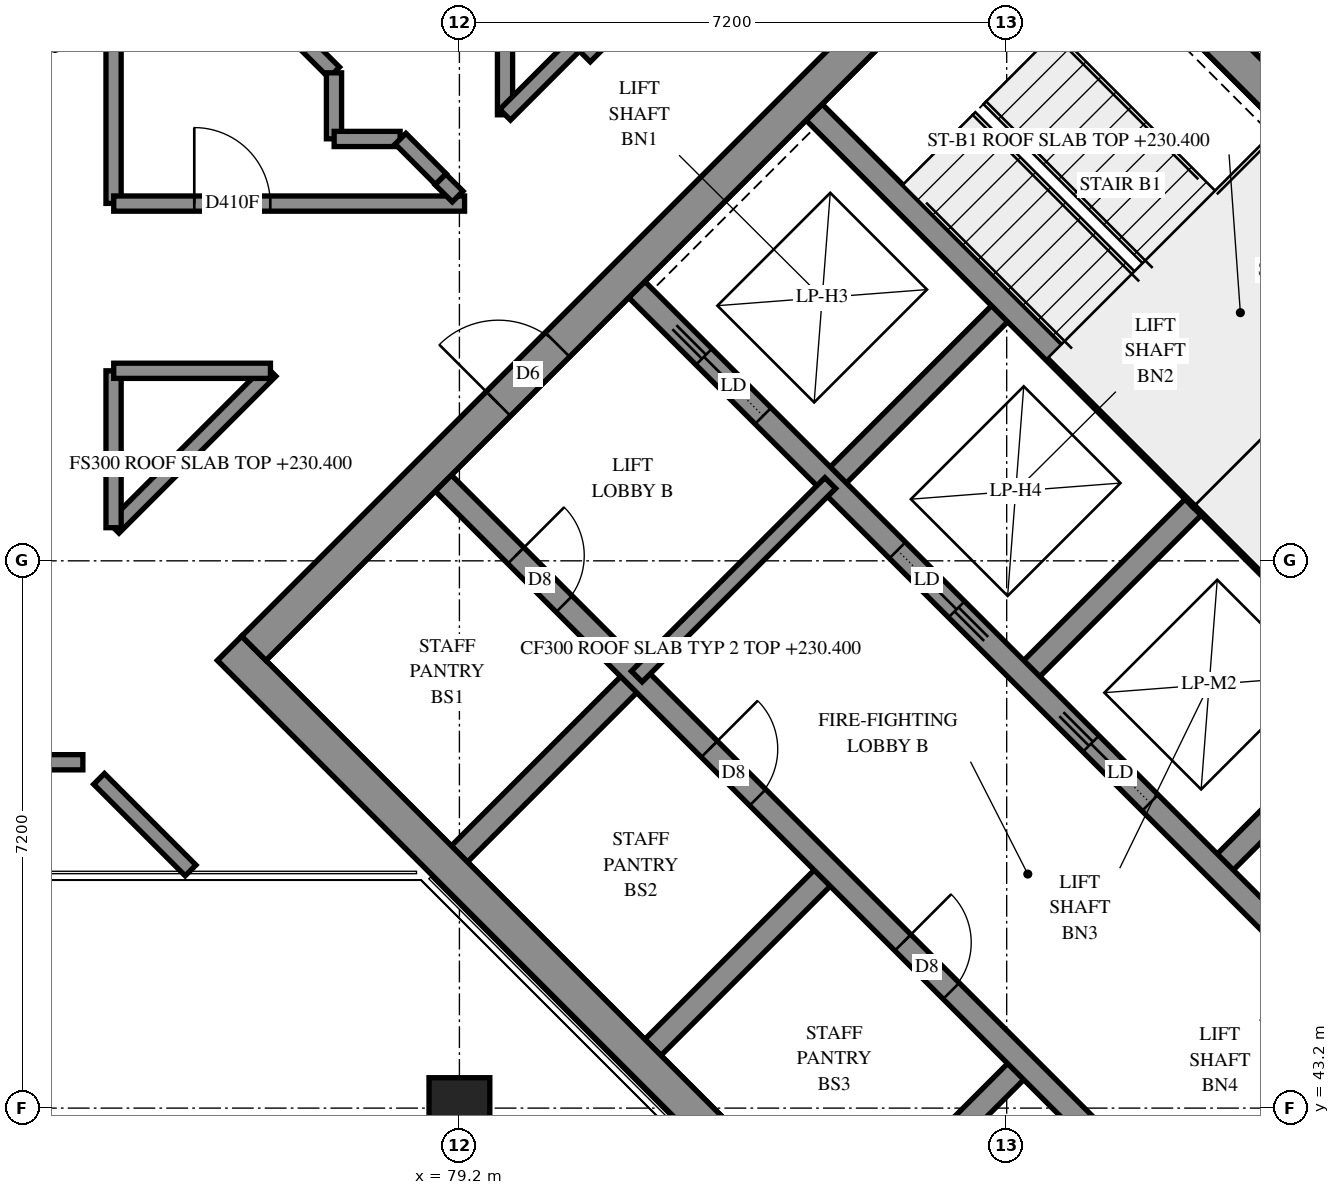
"""IFC4 building model, lengths in metres.
Left out: names, types, materials, properties, quantities, classifications, styles, units other than length and angle.
Written with IfcOpenShell. Run it as: python <this file> out.ifc"""

import sys

from ifc_helpers import new_model, si_unit, direction, frame, frame_2d, origin, origin_2d, place, context, subcontext, project, spatial, polyline, rectangle, outline, extrude, element, fill, save


model = new_model("IFC4")
c1 = context("Model", 3, precision=1e-05, world=origin(), true_north=direction((0.0, 1.0)))
c2 = subcontext(c1, "Body", "Model", "MODEL_VIEW")
j1 = project(units=[si_unit("LENGTHUNIT", "METRE"), si_unit("PLANEANGLEUNIT", "RADIAN")], contexts=[c1])
p1 = place(None, origin())
s1 = spatial("IfcSite", under=j1, at=p1, CompositionType="ELEMENT")
p2 = place(p1, origin())
s2 = spatial("IfcBuilding", under=s1, at=p2, CompositionType="ELEMENT")
p3 = place(p2, frame((0.0, 0.0, 230.4)))
s3 = spatial("IfcBuildingStorey", under=s2, at=p3, CompositionType="ELEMENT", Elevation=230.4)
p4 = place(p3, frame((79.2, 43.2, 0.0), z_axis=(0.0, 0.0, 1.0), x_axis=(1.0, 0.0, 0.0)))
e1 = element("IfcColumn", 1, at=p4, inside=s3, PredefinedType="COLUMN", context=c2, shape_type="SweptSolid", body=[
    extrude(rectangle(XDim=0.8, YDim=0.8, at=origin_2d()), origin(), (0.0, 0.0, 1.0), 3.9),
])
p5 = place(p3, frame((76.177, 49.249, -0.3), z_axis=(0.0, 0.0, 1.0), x_axis=(0.7071100491, -0.7071035132, 0.0)))
e2 = element("IfcWall", 2, at=p5, inside=s3, PredefinedType="SHEAR", context=c2, shape_type="SweptSolid", body=[
    extrude(rectangle(XDim=15.3, YDim=0.45, at=frame_2d((7.65, 0.0))), origin(), (0.0, 0.0, 1.0), 3.5),
])
p6 = place(p3, frame((86.678, 59.749, -0.3), z_axis=(0.0, 0.0, 1.0), x_axis=(0.7071035132, -0.7071100491, 0.0)))
e3 = element("IfcWall", 3, at=p6, inside=s3, PredefinedType="SHEAR", context=c2, shape_type="SweptSolid", body=[
    extrude(rectangle(XDim=15.3, YDim=0.45, at=frame_2d((7.65, 0.0))), origin(), (0.0, 0.0, 1.0), 3.5),
])
p7 = place(p6, frame((10.45, 0.0, 0.3)))
e4 = element("IfcOpeningElement", 4, at=p7, cuts=e3, PredefinedType="OPENING", context=c2, shape_type="SweptSolid", body=[
    extrude(rectangle(XDim=0.8, YDim=2.1, at=frame_2d((0.4, 1.05))), frame((0.0, 0.235, 0.0), z_axis=(0.0, -1.0, 0.0), x_axis=(1.0, 0.0, 0.0)), (0.0, 0.0, 1.0), 0.47),
])
p8 = place(p3, frame((76.495, 49.249, -0.3), z_axis=(0.0, 0.0, 1.0), x_axis=(0.7071067812, 0.7071067812, 0.0)))
e5 = element("IfcWall", 5, at=p8, inside=s3, PredefinedType="SHEAR", context=c2, shape_type="SweptSolid", body=[
    extrude(rectangle(XDim=14.4, YDim=0.45, at=frame_2d((7.2, 0.0))), origin(), (0.0, 0.0, 1.0), 3.5),
])
p9 = place(p8, frame((4.55, 0.0, 0.3)))
e6 = element("IfcOpeningElement", 6, at=p9, cuts=e5, PredefinedType="OPENING", context=c2, shape_type="SweptSolid", body=[
    extrude(rectangle(XDim=1.1, YDim=2.1, at=frame_2d((0.55, 1.05))), frame((0.0, 0.235, 0.0), z_axis=(0.0, -1.0, 0.0), x_axis=(1.0, 0.0, 0.0)), (0.0, 0.0, 1.0), 0.47),
])
p10 = place(p8, frame((11.35, 0.0, 0.3)))
e7 = element("IfcOpeningElement", 7, at=p10, cuts=e5, PredefinedType="OPENING", context=c2, shape_type="SweptSolid", body=[
    extrude(rectangle(XDim=1.1, YDim=2.1, at=frame_2d((0.55, 1.05))), frame((0.0, 0.235, 0.0), z_axis=(0.0, -1.0, 0.0), x_axis=(1.0, 0.0, 0.0)), (0.0, 0.0, 1.0), 0.47),
])
p11 = place(p3, frame((86.996, 38.748, -0.3), z_axis=(0.0, 0.0, 1.0), x_axis=(0.7071067812, 0.7071067812, 0.0)))
e8 = element("IfcWall", 8, at=p11, inside=s3, PredefinedType="SHEAR", context=c2, shape_type="SweptSolid", body=[
    extrude(rectangle(XDim=14.4, YDim=0.45, at=frame_2d((7.2, 0.0))), origin(), (0.0, 0.0, 1.0), 3.5),
])
p12 = place(p11, frame((4.55, 0.0, 0.3)))
e9 = element("IfcOpeningElement", 9, at=p12, cuts=e8, PredefinedType="OPENING", context=c2, shape_type="SweptSolid", body=[
    extrude(rectangle(XDim=1.1, YDim=2.1, at=frame_2d((0.55, 1.05))), frame((0.0, 0.235, 0.0), z_axis=(0.0, -1.0, 0.0), x_axis=(1.0, 0.0, 0.0)), (0.0, 0.0, 1.0), 0.47),
])
p13 = place(p11, frame((11.35, 0.0, 0.3)))
e10 = element("IfcOpeningElement", 10, at=p13, cuts=e8, PredefinedType="OPENING", context=c2, shape_type="SweptSolid", body=[
    extrude(rectangle(XDim=1.1, YDim=2.1, at=frame_2d((0.55, 1.05))), frame((0.0, 0.235, 0.0), z_axis=(0.0, -1.0, 0.0), x_axis=(1.0, 0.0, 0.0)), (0.0, 0.0, 1.0), 0.47),
])
for number, where, z_axis, x_axis in (
    (11, (79.2, 46.544, 0.0), (0.0, 0.0, 1.0), (0.707, 0.707, 0.0)),
    (12, (84.079, 51.423, 0.0), (0.0, 0.0, 1.0), (0.707, 0.707, 0.0)),
):
    element("IfcWall", number, at=place(p3, frame(where, z_axis=z_axis, x_axis=x_axis)), inside=s3, PredefinedType="SOLIDWALL", context=c2, shape_type="SweptSolid", body=[
        extrude(rectangle(XDim=3.3, YDim=0.3, at=frame_2d((1.65, 0.0))), origin(), (0.0, 0.0, 1.0), 3.9),
    ])
p14 = place(p3, frame((81.746, 43.999, 0.0), z_axis=(0.0, 0.0, 1.0), x_axis=(0.7071067812, 0.7071067812, 0.0)))
e13 = element("IfcWall", 13, at=p14, inside=s3, PredefinedType="SOLIDWALL", context=c2, shape_type="SweptSolid", body=[
    extrude(rectangle(XDim=3.3, YDim=0.3, at=frame_2d((1.65, 0.0))), origin(), (0.0, 0.0, 1.0), 3.9),
])
p15 = place(p3, frame((86.625, 48.878, 0.0), z_axis=(0.0, 0.0, 1.0), x_axis=(0.7071067812, 0.7071067812, 0.0)))
e14 = element("IfcWall", 14, at=p15, inside=s3, PredefinedType="SOLIDWALL", context=c2, shape_type="SweptSolid", body=[
    extrude(rectangle(XDim=3.3, YDim=0.3, at=frame_2d((1.65, 0.0))), origin(), (0.0, 0.0, 1.0), 3.9),
])
p16 = place(p3, frame((84.291, 41.453, 0.0), z_axis=(0.0, 0.0, 1.0), x_axis=(0.7071067812, 0.7071067812, 0.0)))
e15 = element("IfcWall", 15, at=p16, inside=s3, PredefinedType="SOLIDWALL", context=c2, shape_type="SweptSolid", body=[
    extrude(rectangle(XDim=3.3, YDim=0.3, at=frame_2d((1.65, 0.0))), origin(), (0.0, 0.0, 1.0), 3.9),
])
p17 = place(p3, frame((89.17, 46.332, 0.0), z_axis=(0.0, 0.0, 1.0), x_axis=(0.7071067812, 0.7071067812, 0.0)))
e16 = element("IfcWall", 16, at=p17, inside=s3, PredefinedType="SOLIDWALL", context=c2, shape_type="SweptSolid", body=[
    extrude(rectangle(XDim=3.3, YDim=0.3, at=frame_2d((1.65, 0.0))), origin(), (0.0, 0.0, 1.0), 3.9),
])
p18 = place(p3, frame((78.988, 51.423, 0.0), z_axis=(0.0, 0.0, 1.0), x_axis=(0.7071067812, -0.7071067812, 0.0)))
e17 = element("IfcWall", 17, at=p18, inside=s3, PredefinedType="SOLIDWALL", context=c2, shape_type="SweptSolid", body=[
    extrude(rectangle(XDim=14.4, YDim=0.3, at=frame_2d((7.2, 0.0))), origin(), (0.0, 0.0, 1.0), 3.9),
])
p19 = place(p18, frame((1.35, 0.0, 0.0)))
e18 = element("IfcOpeningElement", 18, at=p19, cuts=e17, PredefinedType="OPENING", context=c2, shape_type="SweptSolid", body=[
    extrude(rectangle(XDim=0.9, YDim=2.1, at=frame_2d((0.45, 1.05))), frame((0.0, 0.16, 0.0), z_axis=(0.0, -1.0, 0.0), x_axis=(1.0, 0.0, 0.0)), (0.0, 0.0, 1.0), 0.32),
])
p20 = place(p18, frame((4.95, 0.0, 0.0)))
e19 = element("IfcOpeningElement", 19, at=p20, cuts=e17, PredefinedType="OPENING", context=c2, shape_type="SweptSolid", body=[
    extrude(rectangle(XDim=0.9, YDim=2.1, at=frame_2d((0.45, 1.05))), frame((0.0, 0.16, 0.0), z_axis=(0.0, -1.0, 0.0), x_axis=(1.0, 0.0, 0.0)), (0.0, 0.0, 1.0), 0.32),
])
p21 = place(p18, frame((8.55, 0.0, 0.0)))
e20 = element("IfcOpeningElement", 20, at=p21, cuts=e17, PredefinedType="OPENING", context=c2, shape_type="SweptSolid", body=[
    extrude(rectangle(XDim=0.9, YDim=2.1, at=frame_2d((0.45, 1.05))), frame((0.0, 0.16, 0.0), z_axis=(0.0, -1.0, 0.0), x_axis=(1.0, 0.0, 0.0)), (0.0, 0.0, 1.0), 0.32),
])
p22 = place(p18, frame((12.05, 0.0, 0.0)))
e21 = element("IfcOpeningElement", 21, at=p22, cuts=e17, PredefinedType="OPENING", context=c2, shape_type="SweptSolid", body=[
    extrude(rectangle(XDim=1.1, YDim=2.1, at=frame_2d((0.55, 1.05))), frame((0.0, 0.16, 0.0), z_axis=(0.0, -1.0, 0.0), x_axis=(1.0, 0.0, 0.0)), (0.0, 0.0, 1.0), 0.32),
])
p23 = place(p3, frame((81.534, 53.969, 0.0), z_axis=(0.0, 0.0, 1.0), x_axis=(0.707103309, -0.7071102534, 0.0)))
e22 = element("IfcWall", 22, at=p23, inside=s3, PredefinedType="SOLIDWALL", context=c2, shape_type="SweptSolid", body=[
    extrude(rectangle(XDim=14.4, YDim=0.3, at=frame_2d((7.2, 0.0))), origin(), (0.0, 0.0, 1.0), 3.9),
])
p24 = place(p23, frame((1.25, 0.0, 0.0)))
e23 = element("IfcOpeningElement", 23, at=p24, cuts=e22, PredefinedType="OPENING", context=c2, shape_type="SweptSolid", body=[
    extrude(rectangle(XDim=1.1, YDim=2.1, at=frame_2d((0.55, 1.05))), frame((0.0, 0.16, 0.0), z_axis=(0.0, -1.0, 0.0), x_axis=(1.0, 0.0, 0.0)), (0.0, 0.0, 1.0), 0.32),
])
p25 = place(p23, frame((4.85, 0.0, 0.0)))
e24 = element("IfcOpeningElement", 24, at=p25, cuts=e22, PredefinedType="OPENING", context=c2, shape_type="SweptSolid", body=[
    extrude(rectangle(XDim=1.1, YDim=2.1, at=frame_2d((0.55, 1.05))), frame((0.0, 0.16, 0.0), z_axis=(0.0, -1.0, 0.0), x_axis=(1.0, 0.0, 0.0)), (0.0, 0.0, 1.0), 0.32),
])
p26 = place(p23, frame((8.45, 0.0, 0.0)))
e25 = element("IfcOpeningElement", 25, at=p26, cuts=e22, PredefinedType="OPENING", context=c2, shape_type="SweptSolid", body=[
    extrude(rectangle(XDim=1.1, YDim=2.1, at=frame_2d((0.55, 1.05))), frame((0.0, 0.16, 0.0), z_axis=(0.0, -1.0, 0.0), x_axis=(1.0, 0.0, 0.0)), (0.0, 0.0, 1.0), 0.32),
])
p27 = place(p23, frame((12.05, 0.0, 0.0)))
e26 = element("IfcOpeningElement", 26, at=p27, cuts=e22, PredefinedType="OPENING", context=c2, shape_type="SweptSolid", body=[
    extrude(rectangle(XDim=1.1, YDim=2.1, at=frame_2d((0.55, 1.05))), frame((0.0, 0.16, 0.0), z_axis=(0.0, -1.0, 0.0), x_axis=(1.0, 0.0, 0.0)), (0.0, 0.0, 1.0), 0.32),
])
for number, where, z_axis, x_axis in (
    (27, (83.867, 56.302, 0.0), (0.0, 0.0, 1.0), (0.707, -0.707, 0.0)),
    (28, (88.958, 51.211, 0.0), (0.0, 0.0, 1.0), (0.707, -0.707, 0.0)),
):
    element("IfcWall", number, at=place(p3, frame(where, z_axis=z_axis, x_axis=x_axis)), inside=s3, PredefinedType="SOLIDWALL", context=c2, shape_type="SweptSolid", body=[
        extrude(rectangle(XDim=7.2, YDim=0.3, at=frame_2d((3.6, 0.0))), origin(), (0.0, 0.0, 1.0), 3.9),
    ])
p28 = place(p3, frame((88.958, 51.211, 0.0), z_axis=(0.0, 0.0, 1.0), x_axis=(0.7071067812, 0.7071067812, 0.0)))
e29 = element("IfcWall", 29, at=p28, inside=s3, PredefinedType="SOLIDWALL", context=c2, shape_type="SweptSolid", body=[
    extrude(rectangle(XDim=4.2, YDim=0.3, at=frame_2d((2.1, 0.0))), origin(), (0.0, 0.0, 1.0), 3.9),
])
p29 = place(p3, frame((102.747, 49.938, 0.0), z_axis=(0.0, 0.0, 1.0), x_axis=(-0.7071083109, 0.7071052514, 0.0)))
e30 = element("IfcWall", 30, at=p29, inside=s3, PredefinedType="SOLIDWALL", context=c2, shape_type="SweptSolid", body=[
    extrude(outline(polyline([(-0.1, -0.1), (32.726, -0.1), (32.644, 0.1), (0.1, 0.1), (-0.1, -0.1)])), origin(), (0.0, 0.0, 1.0), 4.2),
])
p30 = place(p3, frame((89.382, 29.786, 0.0), z_axis=(0.0, 0.0, 1.0), x_axis=(0.7071094267, 0.7071041357, 0.0)))
e31 = element("IfcWall", 31, at=p30, inside=s3, PredefinedType="SOLIDWALL", context=c2, shape_type="SweptSolid", body=[
    extrude(outline(polyline([(-0.1, -0.1), (19.0, -0.1), (18.8, 0.1), (0.1, 0.1), (-0.1, -0.1)])), origin(), (0.0, 0.0, 1.0), 4.2),
])
p31 = place(p3, frame((81.534, 48.878, 0.0), z_axis=(0.0, 0.0, 1.0), x_axis=(0.707092892, 0.7071206701, 0.0)))
e32 = element("IfcWall", 32, at=p31, inside=s3, PredefinedType="PARTITIONING", context=c2, shape_type="SweptSolid", body=[
    extrude(rectangle(XDim=3.6, YDim=0.2, at=frame_2d((1.8, 0.0))), origin(), (0.0, 0.0, 1.0), 3.9),
])
p32 = place(p3, frame((54.95, 47.75, 0.0), z_axis=(0.0, 0.0, 1.0), x_axis=(1.0, 0.0, 0.0)))
e33 = element("IfcWall", 33, at=p32, inside=s3, PredefinedType="PARTITIONING", context=c2, shape_type="SweptSolid", body=[
    extrude(rectangle(XDim=19.296, YDim=0.2, at=frame_2d((9.648, 0.0))), origin(), (0.0, 0.0, 1.0), 3.9),
])
p33 = place(p32, frame((11.997, 0.0, 0.0)))
e34 = element("IfcOpeningElement", 34, at=p33, cuts=e33, PredefinedType="OPENING", context=c2, shape_type="SweptSolid", body=[
    extrude(rectangle(XDim=1.0, YDim=2.1, at=frame_2d((0.5, 1.05))), frame((0.0, 0.11, 0.0), z_axis=(0.0, -1.0, 0.0), x_axis=(1.0, 0.0, 0.0)), (0.0, 0.0, 1.0), 0.22),
])
p34 = place(p3, frame((80.851, 57.035, 0.0), z_axis=(0.0, 0.0, 1.0), x_axis=(0.7071067812, 0.7071067812, 0.0)))
e35 = element("IfcWall", 35, at=p34, inside=s3, PredefinedType="PARTITIONING", context=c2, shape_type="SweptSolid", body=[
    extrude(rectangle(XDim=6.285, YDim=0.2, at=frame_2d((3.142, 0.0))), origin(), (0.0, 0.0, 1.0), 3.9),
])
p35 = place(p34, frame((0.81, 0.0, 0.0)))
e36 = element("IfcOpeningElement", 36, at=p35, cuts=e35, PredefinedType="OPENING", context=c2, shape_type="SweptSolid", body=[
    extrude(rectangle(XDim=1.0, YDim=2.1, at=frame_2d((0.5, 1.05))), frame((0.0, 0.11, 0.0), z_axis=(0.0, -1.0, 0.0), x_axis=(1.0, 0.0, 0.0)), (0.0, 0.0, 1.0), 0.22),
])
p36 = place(p3, frame((74.65, 55.102, 0.0), z_axis=(0.0, 0.0, 1.0), x_axis=(0.0, 1.0, 0.0)))
e37 = element("IfcWall", 37, at=p36, inside=s3, PredefinedType="PARTITIONING", context=c2, shape_type="SweptSolid", body=[
    extrude(rectangle(XDim=4.616, YDim=0.2, at=frame_2d((2.308, 0.0))), origin(), (0.0, 0.0, 1.0), 3.9),
])
p37 = place(p3, frame((74.652, 55.1, 0.0), z_axis=(0.0, 0.0, 1.0), x_axis=(1.0, 0.0, 0.0)))
e38 = element("IfcWall", 38, at=p37, inside=s3, PredefinedType="PARTITIONING", context=c2, shape_type="SweptSolid", body=[
    extrude(rectangle(XDim=4.616, YDim=0.2, at=frame_2d((2.308, 0.0))), origin(), (0.0, 0.0, 1.0), 3.9),
])
p38 = place(p37, frame((1.06, 0.0, 0.0)))
e39 = element("IfcOpeningElement", 39, at=p38, cuts=e38, PredefinedType="OPENING", context=c2, shape_type="SweptSolid", body=[
    extrude(rectangle(XDim=1.0, YDim=2.1, at=frame_2d((0.5, 1.05))), frame((0.0, 0.11, 0.0), z_axis=(0.0, -1.0, 0.0), x_axis=(1.0, 0.0, 0.0)), (0.0, 0.0, 1.0), 0.22),
])
p39 = place(p3, frame((79.8, 56.268, 0.0), z_axis=(0.0, 0.0, 1.0), x_axis=(0.0, 1.0, 0.0)))
e40 = element("IfcWall", 40, at=p39, inside=s3, PredefinedType="PARTITIONING", context=c2, shape_type="SweptSolid", body=[
    extrude(rectangle(XDim=2.982, YDim=0.2, at=frame_2d((1.491, 0.0))), origin(), (0.0, 0.0, 1.0), 3.9),
])
p40 = place(p3, frame((74.651, 50.835, 0.0), z_axis=(0.0, 0.0, 1.0), x_axis=(0.7071067812, 0.7071067812, 0.0)))
e41 = element("IfcWall", 41, at=p40, inside=s3, PredefinedType="PARTITIONING", context=c2, shape_type="SweptSolid", body=[
    extrude(rectangle(XDim=2.919, YDim=0.2, at=frame_2d((1.459, 0.0))), origin(), (0.0, 0.0, 1.0), 3.9),
])
p41 = place(p3, frame((75.878, 58.496, 0.0), z_axis=(0.0, 0.0, 1.0), x_axis=(0.7075293128, -0.706683997, 0.0)))
e42 = element("IfcWall", 42, at=p41, inside=s3, PredefinedType="PARTITIONING", context=c2, shape_type="SweptSolid", body=[
    extrude(rectangle(XDim=2.366, YDim=0.2, at=frame_2d((1.183, 0.0))), origin(), (0.0, 0.0, 1.0), 3.9),
])
p42 = place(p3, frame((74.65, 50.836, 0.0), z_axis=(0.0, 0.0, 1.0), x_axis=(0.0, 1.0, 0.0)))
e43 = element("IfcWall", 43, at=p42, inside=s3, PredefinedType="PARTITIONING", context=c2, shape_type="SweptSolid", body=[
    extrude(rectangle(XDim=2.064, YDim=0.2, at=frame_2d((1.032, 0.0))), origin(), (0.0, 0.0, 1.0), 3.9),
])
p43 = place(p3, frame((74.652, 52.9, 0.0), z_axis=(0.0, 0.0, 1.0), x_axis=(1.0, 0.0, 0.0)))
e44 = element("IfcWall", 44, at=p43, inside=s3, PredefinedType="PARTITIONING", context=c2, shape_type="SweptSolid", body=[
    extrude(rectangle(XDim=2.062, YDim=0.2, at=frame_2d((1.031, 0.0))), origin(), (0.0, 0.0, 1.0), 3.9),
])
p44 = place(p3, frame((74.459, 47.531, 0.0), z_axis=(0.0, 0.0, 1.0), x_axis=(0.7071067812, -0.7071067812, 0.0)))
e45 = element("IfcWall", 45, at=p44, inside=s3, PredefinedType="PARTITIONING", context=c2, shape_type="SweptSolid", body=[
    extrude(rectangle(XDim=1.703, YDim=0.2, at=frame_2d((0.851, 0.0))), origin(), (0.0, 0.0, 1.0), 3.9),
])
p45 = place(p3, frame((79.801, 56.269, 0.0), z_axis=(0.0, 0.0, 1.0), x_axis=(0.7071067812, 0.7071067812, 0.0)))
e46 = element("IfcWall", 46, at=p45, inside=s3, PredefinedType="PARTITIONING", context=c2, shape_type="SweptSolid", body=[
    extrude(rectangle(XDim=1.482, YDim=0.2, at=frame_2d((0.741, 0.0))), origin(), (0.0, 0.0, 1.0), 3.9),
])
for number, where, z_axis, x_axis in (
    (47, (77.55, 55.952, 0.0), (0.0, 0.0, 1.0), (0.0, 1.0, 0.0)),
    (48, (77.552, 55.95, 0.0), (0.0, 0.0, 1.0), (1.0, 0.0, 0.0)),
):
    element("IfcWall", number, at=place(p3, frame(where, z_axis=z_axis, x_axis=x_axis)), inside=s3, PredefinedType="PARTITIONING", context=c2, shape_type="SweptSolid", body=[
        extrude(rectangle(XDim=0.868, YDim=0.2, at=frame_2d((0.434, 0.0))), origin(), (0.0, 0.0, 1.0), 3.9),
    ])
p46 = place(p3, frame((78.425, 55.953, 0.0), z_axis=(0.0, 0.0, 1.0), x_axis=(0.7057738785, -0.7084371761, 0.0)))
e49 = element("IfcWall", 49, at=p46, inside=s3, PredefinedType="PARTITIONING", context=c2, shape_type="SweptSolid", body=[
    extrude(rectangle(XDim=0.751, YDim=0.2, at=frame_2d((0.376, 0.0))), origin(), (0.0, 0.0, 1.0), 3.9),
])
p47 = place(p3, frame((78.951, 55.417, 0.0), z_axis=(0.0, 0.0, 1.0), x_axis=(0.709302262, -0.7049044624, 0.0)))
e50 = element("IfcWall", 50, at=p47, inside=s3, PredefinedType="PARTITIONING", context=c2, shape_type="SweptSolid", body=[
    extrude(rectangle(XDim=0.318, YDim=0.2, at=frame_2d((0.159, 0.0))), origin(), (0.0, 0.0, 1.0), 3.9),
])
p48 = place(p9, origin())
e51 = element("IfcDoor", 51, at=p48, inside=s3, OperationType="DOUBLE_DOOR_SINGLE_SWING", PredefinedType="DOOR", context=c2, shape_type="SweptSolid", body=[
    extrude(rectangle(XDim=1.1, YDim=2.1, at=frame_2d((0.55, 1.05))), frame((0.0, 0.025, 0.0), z_axis=(0.0, -1.0, 0.0), x_axis=(1.0, 0.0, 0.0)), (0.0, 0.0, 1.0), 0.05),
])
fill(e6, e51)
p49 = place(p19, origin())
e52 = element("IfcDoor", 52, at=p49, inside=s3, OperationType="SINGLE_SWING_LEFT", PredefinedType="DOOR", context=c2, shape_type="SweptSolid", body=[
    extrude(rectangle(XDim=0.9, YDim=2.1, at=frame_2d((0.45, 1.05))), frame((0.0, 0.025, 0.0), z_axis=(0.0, -1.0, 0.0), x_axis=(1.0, 0.0, 0.0)), (0.0, 0.0, 1.0), 0.05),
])
fill(e18, e52)
p50 = place(p20, origin())
e53 = element("IfcDoor", 53, at=p50, inside=s3, OperationType="SINGLE_SWING_LEFT", PredefinedType="DOOR", context=c2, shape_type="SweptSolid", body=[
    extrude(rectangle(XDim=0.9, YDim=2.1, at=frame_2d((0.45, 1.05))), frame((0.0, 0.025, 0.0), z_axis=(0.0, -1.0, 0.0), x_axis=(1.0, 0.0, 0.0)), (0.0, 0.0, 1.0), 0.05),
])
fill(e19, e53)
p51 = place(p21, origin())
e54 = element("IfcDoor", 54, at=p51, inside=s3, OperationType="SINGLE_SWING_LEFT", PredefinedType="DOOR", context=c2, shape_type="SweptSolid", body=[
    extrude(rectangle(XDim=0.9, YDim=2.1, at=frame_2d((0.45, 1.05))), frame((0.0, 0.025, 0.0), z_axis=(0.0, -1.0, 0.0), x_axis=(1.0, 0.0, 0.0)), (0.0, 0.0, 1.0), 0.05),
])
fill(e20, e54)
p52 = place(p24, origin())
e55 = element("IfcDoor", 55, at=p52, inside=s3, OperationType="SLIDING_TO_LEFT", PredefinedType="DOOR", context=c2, shape_type="SweptSolid", body=[
    extrude(rectangle(XDim=1.1, YDim=2.1, at=frame_2d((0.55, 1.05))), frame((0.0, 0.025, 0.0), z_axis=(0.0, -1.0, 0.0), x_axis=(1.0, 0.0, 0.0)), (0.0, 0.0, 1.0), 0.05),
])
fill(e23, e55)
p53 = place(p25, origin())
e56 = element("IfcDoor", 56, at=p53, inside=s3, OperationType="SLIDING_TO_RIGHT", PredefinedType="DOOR", context=c2, shape_type="SweptSolid", body=[
    extrude(rectangle(XDim=1.1, YDim=2.1, at=frame_2d((0.55, 1.05))), frame((0.0, 0.025, 0.0), z_axis=(0.0, -1.0, 0.0), x_axis=(1.0, 0.0, 0.0)), (0.0, 0.0, 1.0), 0.05),
])
fill(e24, e56)
p54 = place(p26, origin())
e57 = element("IfcDoor", 57, at=p54, inside=s3, OperationType="SLIDING_TO_LEFT", PredefinedType="DOOR", context=c2, shape_type="SweptSolid", body=[
    extrude(rectangle(XDim=1.1, YDim=2.1, at=frame_2d((0.55, 1.05))), frame((0.0, 0.025, 0.0), z_axis=(0.0, -1.0, 0.0), x_axis=(1.0, 0.0, 0.0)), (0.0, 0.0, 1.0), 0.05),
])
fill(e25, e57)
p55 = place(p38, origin())
e58 = element("IfcDoor", 58, at=p55, inside=s3, OperationType="SINGLE_SWING_LEFT", PredefinedType="DOOR", context=c2, shape_type="SweptSolid", body=[
    extrude(rectangle(XDim=1.0, YDim=2.1, at=frame_2d((0.5, 1.05))), frame((0.0, 0.025, 0.0), z_axis=(0.0, -1.0, 0.0), x_axis=(1.0, 0.0, 0.0)), (0.0, 0.0, 1.0), 0.05),
])
fill(e39, e58)
save(model, sys.argv[1])
